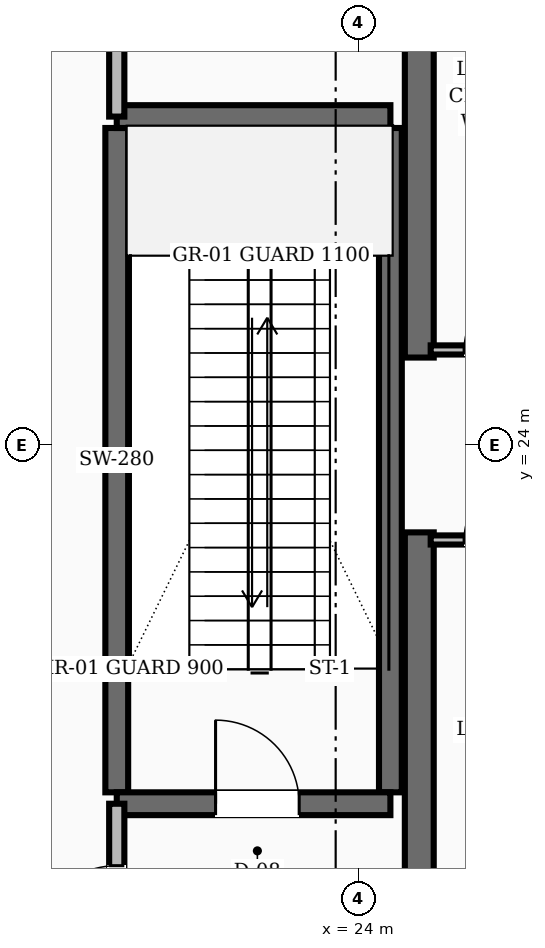
"""IFC4 building model, lengths in metres.
Left out: names, types, materials, properties, quantities, classifications, styles, units other than length and angle.
Written with IfcOpenShell. Run it as: python <this file> out.ifc"""

import sys

from ifc_helpers import new_model, si_unit, direction, frame, frame_2d, origin, place, context, subcontext, project, spatial, rectangle, extrude, element, fill, save


model = new_model("IFC4")
c1 = context("Model", 3, precision=1e-05, world=origin(), true_north=direction((0.0, 1.0)))
c2 = subcontext(c1, "Body", "Model", "MODEL_VIEW")
j1 = project(units=[si_unit("LENGTHUNIT", "METRE"), si_unit("PLANEANGLEUNIT", "RADIAN")], contexts=[c1])
p1 = place(None, origin())
s1 = spatial("IfcSite", under=j1, at=p1, CompositionType="ELEMENT")
p2 = place(p1, origin())
s2 = spatial("IfcBuilding", under=s1, at=p2, CompositionType="ELEMENT")
p3 = place(p2, frame((0.0, 0.0, 110.8)))
s3 = spatial("IfcBuildingStorey", under=s2, at=p3, CompositionType="ELEMENT", Elevation=110.8)
for number, where, z_axis, x_axis in (
    (1, (24.8, 16.55, 0.0), (0.0, 0.0, 1.0), (0.0, 1.0, 0.0)),
    (2, (24.8, 25.15, 0.0), (0.0, 0.0, 1.0), (0.0, 1.0, 0.0)),
):
    element("IfcWall", number, at=place(p3, frame(where, z_axis=z_axis, x_axis=x_axis)), inside=s3, PredefinedType="SHEAR", context=c2, shape_type="SweptSolid", body=[
        extrude(rectangle(XDim=6.3, YDim=0.38, at=frame_2d((3.15, 0.0))), origin(), (0.0, 0.0, 1.0), 6.4),
    ])
for number, where, z_axis, x_axis in (
    (3, (20.82, 19.43, 0.0), (0.0, 0.0, 1.0), (0.0, 1.0, 0.0)),
    (4, (24.42, 19.43, 0.0), (0.0, 0.0, 1.0), (0.0, 1.0, 0.0)),
):
    element("IfcWall", number, at=place(p3, frame(where, z_axis=z_axis, x_axis=x_axis)), inside=s3, PredefinedType="SHEAR", context=c2, shape_type="SweptSolid", body=[
        extrude(rectangle(XDim=8.74, YDim=0.3, at=frame_2d((4.37, 0.0))), origin(), (0.0, 0.0, 1.0), 6.4),
    ])
p4 = place(p3, frame((20.82, 19.28, 0.0), z_axis=(0.0, 0.0, 1.0), x_axis=(1.0, 0.0, 0.0)))
e5 = element("IfcWall", 5, at=p4, inside=s3, PredefinedType="SHEAR", context=c2, shape_type="SweptSolid", body=[
    extrude(rectangle(XDim=3.6, YDim=0.3, at=frame_2d((1.8, 0.0))), origin(), (0.0, 0.0, 1.0), 6.4),
])
p5 = place(p4, frame((1.3, 0.0, 0.0)))
e6 = element("IfcOpeningElement", 6, at=p5, cuts=e5, PredefinedType="OPENING", context=c2, shape_type="SweptSolid", body=[
    extrude(rectangle(XDim=1.1, YDim=2.1, at=frame_2d((0.55, 1.05))), frame((0.0, 0.16, 0.0), z_axis=(0.0, -1.0, 0.0), x_axis=(1.0, 0.0, 0.0)), (0.0, 0.0, 1.0), 0.32),
])
p6 = place(p3, frame((20.82, 28.32, 0.0), z_axis=(0.0, 0.0, 1.0), x_axis=(1.0, 0.0, 0.0)))
e7 = element("IfcWall", 7, at=p6, inside=s3, PredefinedType="SHEAR", context=c2, shape_type="SweptSolid", body=[
    extrude(rectangle(XDim=3.6, YDim=0.3, at=frame_2d((1.8, 0.0))), origin(), (0.0, 0.0, 1.0), 6.4),
])
p7 = place(p3, frame((20.82, 16.55, 0.0), z_axis=(0.0, 0.0, 1.0), x_axis=(0.0, 1.0, 0.0)))
e8 = element("IfcWall", 8, at=p7, inside=s3, PredefinedType="SOLIDWALL", context=c2, shape_type="SweptSolid", body=[
    extrude(rectangle(XDim=2.73, YDim=0.2, at=frame_2d((1.365, 0.0))), origin(), (0.0, 0.0, 1.0), 5.12),
])
p8 = place(p7, frame((0.815, 0.0, 0.0)))
e9 = element("IfcOpeningElement", 9, at=p8, cuts=e8, PredefinedType="OPENING", context=c2, shape_type="SweptSolid", body=[
    extrude(rectangle(XDim=1.1, YDim=2.1, at=frame_2d((0.55, 1.05))), frame((0.0, 0.11, 0.0), z_axis=(0.0, -1.0, 0.0), x_axis=(1.0, 0.0, 0.0)), (0.0, 0.0, 1.0), 0.22),
])
p9 = place(p3, frame((20.82, 28.32, 0.0), z_axis=(0.0, 0.0, 1.0), x_axis=(0.0, 1.0, 0.0)))
e10 = element("IfcWall", 10, at=p9, inside=s3, PredefinedType="SOLIDWALL", context=c2, shape_type="SweptSolid", body=[
    extrude(rectangle(XDim=3.13, YDim=0.2, at=frame_2d((1.565, 0.0))), origin(), (0.0, 0.0, 1.0), 5.12),
])
p10 = place(p9, frame((1.09, 0.0, 0.0)))
e11 = element("IfcOpeningElement", 11, at=p10, cuts=e10, PredefinedType="OPENING", context=c2, shape_type="SweptSolid", body=[
    extrude(rectangle(XDim=0.95, YDim=2.1, at=frame_2d((0.475, 1.05))), frame((0.0, 0.11, 0.0), z_axis=(0.0, -1.0, 0.0), x_axis=(1.0, 0.0, 0.0)), (0.0, 0.0, 1.0), 0.22),
])
p11 = place(p3, frame((24.95, 25.25, 0.0), z_axis=(0.0, 0.0, 1.0), x_axis=(1.0, 0.0, 0.0)))
e12 = element("IfcWall", 12, at=p11, inside=s3, PredefinedType="PARTITIONING", context=c2, shape_type="SweptSolid", body=[
    extrude(rectangle(XDim=3.2, YDim=0.12, at=frame_2d((1.6, 0.0))), origin(), (0.0, 0.0, 1.0), 5.12),
])
p12 = place(p11, frame((0.44, 0.0, 0.0)))
e13 = element("IfcOpeningElement", 13, at=p12, cuts=e12, PredefinedType="OPENING", context=c2, shape_type="SweptSolid", body=[
    extrude(rectangle(XDim=0.86, YDim=2.1, at=frame_2d((0.43, 1.05))), frame((0.0, 0.07, 0.0), z_axis=(0.0, -1.0, 0.0), x_axis=(1.0, 0.0, 0.0)), (0.0, 0.0, 1.0), 0.14),
])
p13 = place(p11, frame((1.9, 0.0, 0.0)))
e14 = element("IfcOpeningElement", 14, at=p13, cuts=e12, PredefinedType="OPENING", context=c2, shape_type="SweptSolid", body=[
    extrude(rectangle(XDim=0.86, YDim=2.1, at=frame_2d((0.43, 1.05))), frame((0.0, 0.07, 0.0), z_axis=(0.0, -1.0, 0.0), x_axis=(1.0, 0.0, 0.0)), (0.0, 0.0, 1.0), 0.14),
])
p14 = place(p3, frame((24.95, 22.75, 0.0), z_axis=(0.0, 0.0, 1.0), x_axis=(1.0, 0.0, 0.0)))
e15 = element("IfcWall", 15, at=p14, inside=s3, PredefinedType="PARTITIONING", context=c2, shape_type="SweptSolid", body=[
    extrude(rectangle(XDim=3.2, YDim=0.12, at=frame_2d((1.6, 0.0))), origin(), (0.0, 0.0, 1.0), 5.12),
])
p15 = place(p14, frame((0.44, 0.0, 0.0)))
e16 = element("IfcOpeningElement", 16, at=p15, cuts=e15, PredefinedType="OPENING", context=c2, shape_type="SweptSolid", body=[
    extrude(rectangle(XDim=0.86, YDim=2.1, at=frame_2d((0.43, 1.05))), frame((0.0, 0.07, 0.0), z_axis=(0.0, -1.0, 0.0), x_axis=(1.0, 0.0, 0.0)), (0.0, 0.0, 1.0), 0.14),
])
p16 = place(p14, frame((1.9, 0.0, 0.0)))
e17 = element("IfcOpeningElement", 17, at=p16, cuts=e15, PredefinedType="OPENING", context=c2, shape_type="SweptSolid", body=[
    extrude(rectangle(XDim=0.86, YDim=2.1, at=frame_2d((0.43, 1.05))), frame((0.0, 0.07, 0.0), z_axis=(0.0, -1.0, 0.0), x_axis=(1.0, 0.0, 0.0)), (0.0, 0.0, 1.0), 0.14),
])
p17 = place(p5, origin())
e18 = element("IfcDoor", 18, at=p17, inside=s3, OperationType="SINGLE_SWING_LEFT", PredefinedType="DOOR", context=c2, shape_type="SweptSolid", body=[
    extrude(rectangle(XDim=1.1, YDim=2.1, at=frame_2d((0.55, 1.05))), frame((0.0, 0.025, 0.0), z_axis=(0.0, -1.0, 0.0), x_axis=(1.0, 0.0, 0.0)), (0.0, 0.0, 1.0), 0.05),
])
fill(e6, e18)
p18 = place(p8, origin())
e19 = element("IfcDoor", 19, at=p18, inside=s3, OperationType="SINGLE_SWING_LEFT", PredefinedType="DOOR", context=c2, shape_type="SweptSolid", body=[
    extrude(rectangle(XDim=1.1, YDim=2.1, at=frame_2d((0.55, 1.05))), frame((0.0, 0.025, 0.0), z_axis=(0.0, -1.0, 0.0), x_axis=(1.0, 0.0, 0.0)), (0.0, 0.0, 1.0), 0.05),
])
fill(e9, e19)
p19 = place(p12, origin())
e20 = element("IfcDoor", 20, at=p19, inside=s3, OperationType="SINGLE_SWING_RIGHT", PredefinedType="DOOR", context=c2, shape_type="SweptSolid", body=[
    extrude(rectangle(XDim=0.86, YDim=2.1, at=frame_2d((0.43, 1.05))), frame((0.0, 0.025, 0.0), z_axis=(0.0, -1.0, 0.0), x_axis=(1.0, 0.0, 0.0)), (0.0, 0.0, 1.0), 0.05),
])
fill(e13, e20)
p20 = place(p15, origin())
e21 = element("IfcDoor", 21, at=p20, inside=s3, OperationType="SINGLE_SWING_RIGHT", PredefinedType="DOOR", context=c2, shape_type="SweptSolid", body=[
    extrude(rectangle(XDim=0.86, YDim=2.1, at=frame_2d((0.43, 1.05))), frame((0.0, 0.025, 0.0), z_axis=(0.0, -1.0, 0.0), x_axis=(1.0, 0.0, 0.0)), (0.0, 0.0, 1.0), 0.05),
])
fill(e16, e21)
save(model, sys.argv[1])
